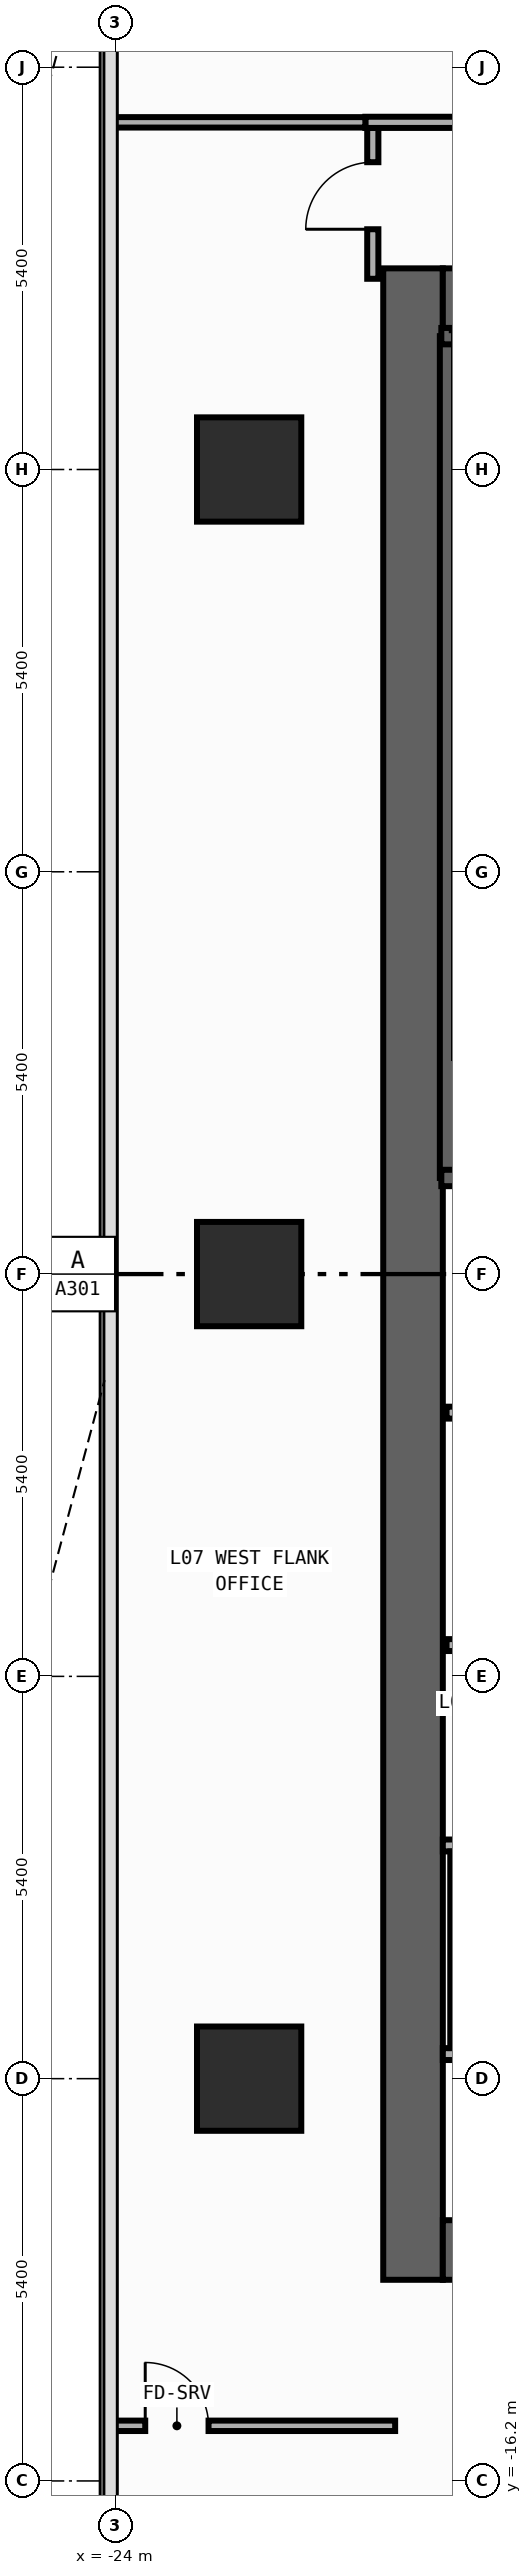
"""IFC4 building model, lengths in metres.
Left out: names, types, materials, properties, quantities, classifications, styles, units other than length and angle.
Written with IfcOpenShell. Run it as: python <this file> out.ifc"""

import sys

from ifc_helpers import new_model, si_unit, direction, frame, frame_2d, origin, origin_2d, place, context, subcontext, project, spatial, rectangle, extrude, element, fill, save


model = new_model("IFC4")
c1 = context("Model", 3, precision=1e-05, world=origin(), true_north=direction((0.0, 1.0)))
c2 = subcontext(c1, "Body", "Model", "MODEL_VIEW")
j1 = project(units=[si_unit("LENGTHUNIT", "METRE"), si_unit("PLANEANGLEUNIT", "RADIAN")], contexts=[c1])
p1 = place(None, origin())
s1 = spatial("IfcSite", under=j1, at=p1, CompositionType="ELEMENT")
p2 = place(p1, origin())
s2 = spatial("IfcBuilding", under=s1, at=p2, CompositionType="ELEMENT")
p3 = place(p2, frame((0.0, 0.0, 30.2)))
s3 = spatial("IfcBuildingStorey", under=s2, at=p3, CompositionType="ELEMENT", Elevation=30.2)
p4 = place(p3, frame((-20.0, -13.5, 0.0), z_axis=(0.0, 0.0, 1.0), x_axis=(0.0, 1.0, 0.0)))
e1 = element("IfcWall", 1, at=p4, inside=s3, PredefinedType="SHEAR", context=c2, shape_type="SweptSolid", body=[
    extrude(rectangle(XDim=27.0, YDim=0.8, at=frame_2d((13.5, 0.0))), origin(), (0.0, 0.0, 1.0), 3.94),
])
for number, where, z_axis, x_axis in (
    (2, (-19.6, -13.1, 0.0), (0.0, 0.0, 1.0), (1.0, 0.0, 0.0)),
    (3, (-19.6, 13.1, 0.0), (0.0, 0.0, 1.0), (1.0, 0.0, 0.0)),
):
    element("IfcWall", number, at=place(p3, frame(where, z_axis=z_axis, x_axis=x_axis)), inside=s3, PredefinedType="SHEAR", context=c2, shape_type="SweptSolid", body=[
        extrude(rectangle(XDim=6.8, YDim=0.8, at=frame_2d((3.4, 0.0))), origin(), (0.0, 0.0, 1.0), 3.94),
    ])
p5 = place(p3, frame((-19.53, 1.29, 0.0), z_axis=(0.0, 0.0, 1.0), x_axis=(0.0, 1.0, 0.0)))
e4 = element("IfcWall", 4, at=p5, inside=s3, PredefinedType="SHEAR", context=c2, shape_type="SweptSolid", body=[
    extrude(rectangle(XDim=11.3, YDim=0.22, at=frame_2d((5.65, 0.0))), origin(), (0.0, 0.0, 1.0), 3.94),
])
p6 = place(p3, frame((-19.62, 12.59, 0.0), z_axis=(0.0, 0.0, 1.0), x_axis=(1.0, 0.0, 0.0)))
e5 = element("IfcWall", 5, at=p6, inside=s3, PredefinedType="SHEAR", context=c2, shape_type="SweptSolid", body=[
    extrude(rectangle(XDim=3.915, YDim=0.22, at=frame_2d((1.958, 0.0))), origin(), (0.0, 0.0, 1.0), 3.94),
])
p7 = place(p3, frame((-19.62, 1.29, 0.0), z_axis=(0.0, 0.0, 1.0), x_axis=(1.0, 0.0, 0.0)))
e6 = element("IfcWall", 6, at=p7, inside=s3, PredefinedType="SHEAR", context=c2, shape_type="SweptSolid", body=[
    extrude(rectangle(XDim=3.915, YDim=0.22, at=frame_2d((1.958, 0.0))), origin(), (0.0, 0.0, 1.0), 3.94),
])
p8 = place(p7, frame((1.08, 0.0, 0.0)))
e7 = element("IfcOpeningElement", 7, at=p8, cuts=e6, PredefinedType="OPENING", context=c2, shape_type="SweptSolid", body=[
    extrude(rectangle(XDim=1.1, YDim=2.2, at=frame_2d((0.55, 1.1))), frame((0.0, 0.12, 0.0), z_axis=(0.0, -1.0, 0.0), x_axis=(1.0, 0.0, 0.0)), (0.0, 0.0, 1.0), 0.24),
])
for number, where, z_axis, x_axis in (
    (8, (-22.2, -10.8, 0.0), (0.0, 0.0, 1.0), (1.0, 0.0, 0.0)),
    (9, (-22.2, 0.0, 0.0), (0.0, 0.0, 1.0), (1.0, 0.0, 0.0)),
    (10, (-22.2, 10.8, 0.0), (0.0, 0.0, 1.0), (1.0, 0.0, 0.0)),
):
    element("IfcColumn", number, at=place(p3, frame(where, z_axis=z_axis, x_axis=x_axis)), inside=s3, PredefinedType="COLUMN", context=c2, shape_type="SweptSolid", body=[
        extrude(rectangle(XDim=1.4, YDim=1.4, at=origin_2d()), origin(), (0.0, 0.0, 1.0), 4.2),
    ])
p9 = place(p3, frame((-19.55, -1.86, 0.0), z_axis=(0.0, 0.0, 1.0), x_axis=(1.0, 0.0, 0.0)))
e11 = element("IfcWall", 11, at=p9, inside=s3, PredefinedType="STANDARD", context=c2, shape_type="SweptSolid", body=[
    extrude(rectangle(XDim=3.8, YDim=0.16, at=frame_2d((1.9, 0.0))), origin(), (0.0, 0.0, 1.0), 3.94),
])
p10 = place(p9, frame((1.18, 0.0, 0.0)))
e12 = element("IfcOpeningElement", 12, at=p10, cuts=e11, PredefinedType="OPENING", context=c2, shape_type="SweptSolid", body=[
    extrude(rectangle(XDim=1.15, YDim=2.2, at=frame_2d((0.575, 1.1))), frame((0.0, 0.09, 0.0), z_axis=(0.0, -1.0, 0.0), x_axis=(1.0, 0.0, 0.0)), (0.0, 0.0, 1.0), 0.18),
])
p11 = place(p3, frame((-19.55, -4.98, 0.0), z_axis=(0.0, 0.0, 1.0), x_axis=(1.0, 0.0, 0.0)))
e13 = element("IfcWall", 13, at=p11, inside=s3, PredefinedType="STANDARD", context=c2, shape_type="SweptSolid", body=[
    extrude(rectangle(XDim=3.8, YDim=0.16, at=frame_2d((1.9, 0.0))), origin(), (0.0, 0.0, 1.0), 3.94),
])
for number, where, z_axis, x_axis in (
    (14, (-19.6, -10.47, 0.0), (0.0, 0.0, 1.0), (1.0, 0.0, 0.0)),
    (15, (-19.6, -7.67, 0.0), (0.0, 0.0, 1.0), (1.0, 0.0, 0.0)),
):
    element("IfcWall", number, at=place(p3, frame(where, z_axis=z_axis, x_axis=x_axis)), inside=s3, PredefinedType="PARTITIONING", context=c2, shape_type="SweptSolid", body=[
        extrude(rectangle(XDim=2.29, YDim=0.16, at=frame_2d((1.145, 0.0))), origin(), (0.0, 0.0, 1.0), 3.94),
    ])
p12 = place(p3, frame((-20.54, 13.36, 0.0), z_axis=(0.0, 0.0, 1.0), x_axis=(0.0, 1.0, 0.0)))
e16 = element("IfcWall", 16, at=p12, inside=s3, PredefinedType="PARTITIONING", context=c2, shape_type="SweptSolid", body=[
    extrude(rectangle(XDim=2.025, YDim=0.15, at=frame_2d((1.012, 0.0))), origin(), (0.0, 0.0, 1.0), 3.94),
])
p13 = place(p12, frame((0.665, 0.0, 0.0)))
e17 = element("IfcOpeningElement", 17, at=p13, cuts=e16, PredefinedType="OPENING", context=c2, shape_type="SweptSolid", body=[
    extrude(rectangle(XDim=0.9, YDim=2.15, at=frame_2d((0.45, 1.075))), frame((0.0, 0.085, 0.0), z_axis=(0.0, -1.0, 0.0), x_axis=(1.0, 0.0, 0.0)), (0.0, 0.0, 1.0), 0.17),
])
p14 = place(p3, frame((-20.64, 15.46, 0.0), z_axis=(0.0, 0.0, 1.0), x_axis=(1.0, 0.0, 0.0)))
e18 = element("IfcWall", 18, at=p14, inside=s3, PredefinedType="PARTITIONING", context=c2, shape_type="SweptSolid", body=[
    extrude(rectangle(XDim=8.65, YDim=0.15, at=frame_2d((4.325, 0.0))), origin(), (0.0, 0.0, 1.0), 3.94),
])
p15 = place(p14, frame((2.871, 0.0, 0.0)))
e19 = element("IfcOpeningElement", 19, at=p15, cuts=e18, PredefinedType="OPENING", context=c2, shape_type="SweptSolid", body=[
    extrude(rectangle(XDim=0.9, YDim=2.15, at=frame_2d((0.45, 1.075))), frame((0.0, 0.085, 0.0), z_axis=(0.0, -1.0, 0.0), x_axis=(1.0, 0.0, 0.0)), (0.0, 0.0, 1.0), 0.17),
])
p16 = place(p3, frame((-24.055, 15.46, 0.0), z_axis=(0.0, 0.0, 1.0), x_axis=(1.0, 0.0, 0.0)))
e20 = element("IfcWall", 20, at=p16, inside=s3, PredefinedType="PARTITIONING", context=c2, shape_type="SweptSolid", body=[
    extrude(rectangle(XDim=3.415, YDim=0.14, at=frame_2d((1.708, 0.0))), origin(), (0.0, 0.0, 1.0), 3.94),
])
p17 = place(p3, frame((-24.055, -15.46, 0.0), z_axis=(0.0, 0.0, 1.0), x_axis=(1.0, 0.0, 0.0)))
e21 = element("IfcWall", 21, at=p17, inside=s3, PredefinedType="PARTITIONING", context=c2, shape_type="SweptSolid", body=[
    extrude(rectangle(XDim=3.815, YDim=0.14, at=frame_2d((1.907, 0.0))), origin(), (0.0, 0.0, 1.0), 3.94),
])
p18 = place(p17, frame((0.46, 0.0, 0.0)))
e22 = element("IfcOpeningElement", 22, at=p18, cuts=e21, PredefinedType="OPENING", context=c2, shape_type="SweptSolid", body=[
    extrude(rectangle(XDim=0.85, YDim=2.1, at=frame_2d((0.425, 1.05))), frame((0.0, 0.08, 0.0), z_axis=(0.0, -1.0, 0.0), x_axis=(1.0, 0.0, 0.0)), (0.0, 0.0, 1.0), 0.16),
])
p19 = place(p3, frame((-19.45, -10.39, 0.0), z_axis=(0.0, 0.0, 1.0), x_axis=(0.0, 1.0, 0.0)))
e23 = element("IfcWall", 23, at=p19, inside=s3, PredefinedType="PARTITIONING", context=c2, shape_type="SweptSolid", body=[
    extrude(rectangle(XDim=2.64, YDim=0.1, at=frame_2d((1.32, 0.0))), origin(), (0.0, 0.0, 1.0), 3.94),
])
p20 = place(p13, origin())
e24 = element("IfcDoor", 24, at=p20, inside=s3, OperationType="SINGLE_SWING_LEFT", PredefinedType="DOOR", context=c2, shape_type="SweptSolid", body=[
    extrude(rectangle(XDim=0.9, YDim=2.15, at=frame_2d((0.45, 1.075))), frame((0.0, 0.025, 0.0), z_axis=(0.0, -1.0, 0.0), x_axis=(1.0, 0.0, 0.0)), (0.0, 0.0, 1.0), 0.05),
])
fill(e17, e24)
p21 = place(p18, origin())
e25 = element("IfcDoor", 25, at=p21, inside=s3, OperationType="SINGLE_SWING_LEFT", PredefinedType="DOOR", context=c2, shape_type="SweptSolid", body=[
    extrude(rectangle(XDim=0.85, YDim=2.1, at=frame_2d((0.425, 1.05))), frame((0.0, 0.025, 0.0), z_axis=(0.0, -1.0, 0.0), x_axis=(1.0, 0.0, 0.0)), (0.0, 0.0, 1.0), 0.05),
])
fill(e22, e25)
save(model, sys.argv[1])
